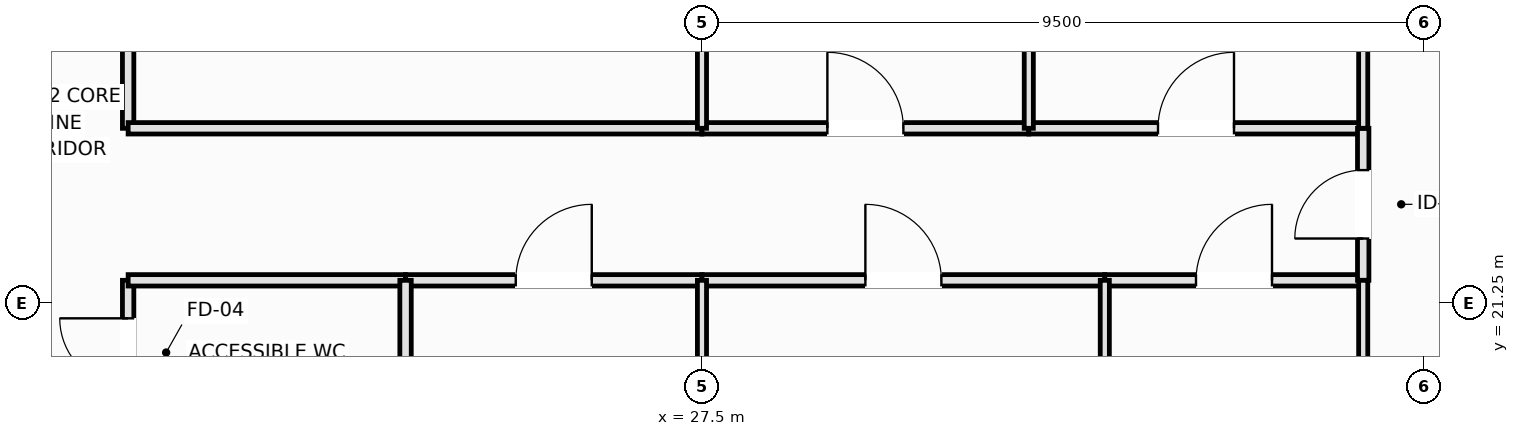
"""IFC4 building model, lengths in metres.
Left out: names, types, materials, properties, quantities, classifications, styles, units other than length and angle.
Written with IfcOpenShell. Run it as: python <this file> out.ifc"""

import sys

from ifc_helpers import new_model, si_unit, direction, frame, frame_2d, origin, place, context, subcontext, project, spatial, rectangle, extrude, element, fill, save


model = new_model("IFC4")
c1 = context("Model", 3, precision=1e-05, world=origin(), true_north=direction((0.0, 1.0)))
c2 = subcontext(c1, "Body", "Model", "MODEL_VIEW")
j1 = project(units=[si_unit("LENGTHUNIT", "METRE"), si_unit("PLANEANGLEUNIT", "RADIAN")], contexts=[c1])
p1 = place(None, origin())
s1 = spatial("IfcSite", under=j1, at=p1, CompositionType="ELEMENT")
p2 = place(p1, origin())
s2 = spatial("IfcBuilding", under=s1, at=p2, CompositionType="ELEMENT")
p3 = place(p2, frame((0.0, 0.0, 127.1)))
s3 = spatial("IfcBuildingStorey", under=s2, at=p3, CompositionType="ELEMENT", Elevation=127.1)
p4 = place(p3, frame((19.95, 19.65, 0.0), z_axis=(0.0, 0.0, 1.0), x_axis=(0.0, 1.0, 0.0)))
e1 = element("IfcWall", 1, at=p4, inside=s3, PredefinedType="PLUMBINGWALL", context=c2, shape_type="SweptSolid", body=[
    extrude(rectangle(XDim=1.9, YDim=0.15, at=frame_2d((0.95, 0.0))), origin(), (0.0, 0.0, 1.0), 3.37),
])
p5 = place(p4, frame((0.5, 0.0, 0.0)))
e2 = element("IfcOpeningElement", 2, at=p5, cuts=e1, PredefinedType="OPENING", context=c2, shape_type="SweptSolid", body=[
    extrude(rectangle(XDim=0.9, YDim=2.1, at=frame_2d((0.45, 1.05))), frame((0.0, 0.085, 0.0), z_axis=(0.0, -1.0, 0.0), x_axis=(1.0, 0.0, 0.0)), (0.0, 0.0, 1.0), 0.17),
])
p6 = place(p3, frame((19.95, 23.55, 0.0), z_axis=(0.0, 0.0, 1.0), x_axis=(0.0, 1.0, 0.0)))
e3 = element("IfcWall", 3, at=p6, inside=s3, PredefinedType="PARTITIONING", context=c2, shape_type="SweptSolid", body=[
    extrude(rectangle(XDim=6.25, YDim=0.15, at=frame_2d((3.125, 0.0))), origin(), (0.0, 0.0, 1.0), 3.37),
])
p7 = place(p6, frame((2.625, 0.0, 0.0)))
e4 = element("IfcOpeningElement", 4, at=p7, cuts=e3, PredefinedType="OPENING", context=c2, shape_type="SweptSolid", body=[
    extrude(rectangle(XDim=1.0, YDim=2.15, at=frame_2d((0.5, 1.075))), frame((0.0, 0.085, 0.0), z_axis=(0.0, -1.0, 0.0), x_axis=(1.0, 0.0, 0.0)), (0.0, 0.0, 1.0), 0.17),
])
p8 = place(p3, frame((19.95, 21.55, 0.0), z_axis=(0.0, 0.0, 1.0), x_axis=(1.0, 0.0, 0.0)))
e5 = element("IfcWall", 5, at=p8, inside=s3, PredefinedType="PLUMBINGWALL", context=c2, shape_type="SweptSolid", body=[
    extrude(rectangle(XDim=3.65, YDim=0.15, at=frame_2d((1.825, 0.0))), origin(), (0.0, 0.0, 1.0), 3.37),
])
p9 = place(p3, frame((23.6, 21.55, 0.0), z_axis=(0.0, 0.0, 1.0), x_axis=(1.0, 0.0, 0.0)))
e6 = element("IfcWall", 6, at=p9, inside=s3, PredefinedType="PARTITIONING", context=c2, shape_type="SweptSolid", body=[
    extrude(rectangle(XDim=3.9, YDim=0.15, at=frame_2d((1.95, 0.0))), origin(), (0.0, 0.0, 1.0), 3.37),
])
p10 = place(p9, frame((1.45, 0.0, 0.0)))
e7 = element("IfcOpeningElement", 7, at=p10, cuts=e6, PredefinedType="OPENING", context=c2, shape_type="SweptSolid", body=[
    extrude(rectangle(XDim=1.0, YDim=2.15, at=frame_2d((0.5, 1.075))), frame((0.0, 0.085, 0.0), z_axis=(0.0, -1.0, 0.0), x_axis=(1.0, 0.0, 0.0)), (0.0, 0.0, 1.0), 0.17),
])
p11 = place(p3, frame((19.95, 23.55, 0.0), z_axis=(0.0, 0.0, 1.0), x_axis=(1.0, 0.0, 0.0)))
e8 = element("IfcWall", 8, at=p11, inside=s3, PredefinedType="PARTITIONING", context=c2, shape_type="SweptSolid", body=[
    extrude(rectangle(XDim=7.55, YDim=0.15, at=frame_2d((3.775, 0.0))), origin(), (0.0, 0.0, 1.0), 3.37),
])
p12 = place(p3, frame((27.5, 21.55, 0.0), z_axis=(0.0, 0.0, 1.0), x_axis=(1.0, 0.0, 0.0)))
e9 = element("IfcWall", 9, at=p12, inside=s3, PredefinedType="PARTITIONING", context=c2, shape_type="SweptSolid", body=[
    extrude(rectangle(XDim=5.3, YDim=0.15, at=frame_2d((2.65, 0.0))), origin(), (0.0, 0.0, 1.0), 3.37),
])
p13 = place(p12, frame((2.15, 0.0, 0.0)))
e10 = element("IfcOpeningElement", 10, at=p13, cuts=e9, PredefinedType="OPENING", context=c2, shape_type="SweptSolid", body=[
    extrude(rectangle(XDim=1.0, YDim=2.15, at=frame_2d((0.5, 1.075))), frame((0.0, 0.085, 0.0), z_axis=(0.0, -1.0, 0.0), x_axis=(1.0, 0.0, 0.0)), (0.0, 0.0, 1.0), 0.17),
])
p14 = place(p3, frame((32.8, 21.55, 0.0), z_axis=(0.0, 0.0, 1.0), x_axis=(1.0, 0.0, 0.0)))
e11 = element("IfcWall", 11, at=p14, inside=s3, PredefinedType="PARTITIONING", context=c2, shape_type="SweptSolid", body=[
    extrude(rectangle(XDim=3.4, YDim=0.15, at=frame_2d((1.7, 0.0))), origin(), (0.0, 0.0, 1.0), 3.37),
])
p15 = place(p14, frame((1.2, 0.0, 0.0)))
e12 = element("IfcOpeningElement", 12, at=p15, cuts=e11, PredefinedType="OPENING", context=c2, shape_type="SweptSolid", body=[
    extrude(rectangle(XDim=1.0, YDim=2.15, at=frame_2d((0.5, 1.075))), frame((0.0, 0.085, 0.0), z_axis=(0.0, -1.0, 0.0), x_axis=(1.0, 0.0, 0.0)), (0.0, 0.0, 1.0), 0.17),
])
p16 = place(p3, frame((27.5, 23.55, 0.0), z_axis=(0.0, 0.0, 1.0), x_axis=(1.0, 0.0, 0.0)))
e13 = element("IfcWall", 13, at=p16, inside=s3, PredefinedType="PARTITIONING", context=c2, shape_type="SweptSolid", body=[
    extrude(rectangle(XDim=4.3, YDim=0.15, at=frame_2d((2.15, 0.0))), origin(), (0.0, 0.0, 1.0), 3.37),
])
p17 = place(p16, frame((1.65, 0.0, 0.0)))
e14 = element("IfcOpeningElement", 14, at=p17, cuts=e13, PredefinedType="OPENING", context=c2, shape_type="SweptSolid", body=[
    extrude(rectangle(XDim=1.0, YDim=2.15, at=frame_2d((0.5, 1.075))), frame((0.0, 0.085, 0.0), z_axis=(0.0, -1.0, 0.0), x_axis=(1.0, 0.0, 0.0)), (0.0, 0.0, 1.0), 0.17),
])
p18 = place(p3, frame((31.8, 23.55, 0.0), z_axis=(0.0, 0.0, 1.0), x_axis=(1.0, 0.0, 0.0)))
e15 = element("IfcWall", 15, at=p18, inside=s3, PredefinedType="PARTITIONING", context=c2, shape_type="SweptSolid", body=[
    extrude(rectangle(XDim=4.4, YDim=0.15, at=frame_2d((2.2, 0.0))), origin(), (0.0, 0.0, 1.0), 3.37),
])
p19 = place(p18, frame((1.7, 0.0, 0.0)))
e16 = element("IfcOpeningElement", 16, at=p19, cuts=e15, PredefinedType="OPENING", context=c2, shape_type="SweptSolid", body=[
    extrude(rectangle(XDim=1.0, YDim=2.15, at=frame_2d((0.5, 1.075))), frame((0.0, 0.085, 0.0), z_axis=(0.0, -1.0, 0.0), x_axis=(1.0, 0.0, 0.0)), (0.0, 0.0, 1.0), 0.17),
])
p20 = place(p3, frame((36.2, 21.55, 0.0), z_axis=(0.0, 0.0, 1.0), x_axis=(0.0, 1.0, 0.0)))
e17 = element("IfcWall", 17, at=p20, inside=s3, PredefinedType="PARTITIONING", context=c2, shape_type="SweptSolid", body=[
    extrude(rectangle(XDim=2.0, YDim=0.15, at=frame_2d((1.0, 0.0))), origin(), (0.0, 0.0, 1.0), 3.37),
])
p21 = place(p20, frame((0.55, 0.0, 0.0)))
e18 = element("IfcOpeningElement", 18, at=p21, cuts=e17, PredefinedType="OPENING", context=c2, shape_type="SweptSolid", body=[
    extrude(rectangle(XDim=0.9, YDim=2.1, at=frame_2d((0.45, 1.05))), frame((0.0, 0.085, 0.0), z_axis=(0.0, -1.0, 0.0), x_axis=(1.0, 0.0, 0.0)), (0.0, 0.0, 1.0), 0.17),
])
p22 = place(p3, frame((23.6, 19.65, 0.0), z_axis=(0.0, 0.0, 1.0), x_axis=(0.0, 1.0, 0.0)))
e19 = element("IfcWall", 19, at=p22, inside=s3, PredefinedType="PLUMBINGWALL", context=c2, shape_type="SweptSolid", body=[
    extrude(rectangle(XDim=1.9, YDim=0.15, at=frame_2d((0.95, 0.0))), origin(), (0.0, 0.0, 1.0), 3.37),
])
p23 = place(p3, frame((27.5, 18.7, 0.0), z_axis=(0.0, 0.0, 1.0), x_axis=(0.0, 1.0, 0.0)))
e20 = element("IfcWall", 20, at=p23, inside=s3, PredefinedType="PARTITIONING", context=c2, shape_type="SweptSolid", body=[
    extrude(rectangle(XDim=2.85, YDim=0.12, at=frame_2d((1.425, 0.0))), origin(), (0.0, 0.0, 1.0), 3.37),
])
p24 = place(p3, frame((27.5, 23.55, 0.0), z_axis=(0.0, 0.0, 1.0), x_axis=(0.0, 1.0, 0.0)))
e21 = element("IfcWall", 21, at=p24, inside=s3, PredefinedType="PARTITIONING", context=c2, shape_type="SweptSolid", body=[
    extrude(rectangle(XDim=6.25, YDim=0.12, at=frame_2d((3.125, 0.0))), origin(), (0.0, 0.0, 1.0), 3.37),
])
for number, where, z_axis, x_axis in (
    (22, (32.8, 3.51, 0.0), (0.0, 0.0, 1.0), (0.0, 1.0, 0.0)),
    (23, (36.2, 3.51, 0.0), (0.0, 0.0, 1.0), (0.0, 1.0, 0.0)),
):
    element("IfcWall", number, at=place(p3, frame(where, z_axis=z_axis, x_axis=x_axis)), inside=s3, PredefinedType="PARTITIONING", context=c2, shape_type="SweptSolid", body=[
        extrude(rectangle(XDim=18.04, YDim=0.12, at=frame_2d((9.02, 0.0))), origin(), (0.0, 0.0, 1.0), 3.37),
    ])
for number, where, z_axis, x_axis in (
    (24, (31.8, 23.55, 0.0), (0.0, 0.0, 1.0), (0.0, 1.0, 0.0)),
    (25, (36.2, 23.55, 0.0), (0.0, 0.0, 1.0), (0.0, 1.0, 0.0)),
):
    element("IfcWall", number, at=place(p3, frame(where, z_axis=z_axis, x_axis=x_axis)), inside=s3, PredefinedType="PARTITIONING", context=c2, shape_type="SweptSolid", body=[
        extrude(rectangle(XDim=22.94, YDim=0.12, at=frame_2d((11.47, 0.0))), origin(), (0.0, 0.0, 1.0), 3.37),
    ])
p25 = place(p5, origin())
e26 = element("IfcDoor", 26, at=p25, inside=s3, OperationType="SINGLE_SWING_RIGHT", PredefinedType="DOOR", context=c2, shape_type="SweptSolid", body=[
    extrude(rectangle(XDim=0.9, YDim=2.1, at=frame_2d((0.45, 1.05))), frame((0.0, 0.025, 0.0), z_axis=(0.0, -1.0, 0.0), x_axis=(1.0, 0.0, 0.0)), (0.0, 0.0, 1.0), 0.05),
])
fill(e2, e26)
p26 = place(p10, origin())
e27 = element("IfcDoor", 27, at=p26, inside=s3, OperationType="SINGLE_SWING_RIGHT", PredefinedType="DOOR", context=c2, shape_type="SweptSolid", body=[
    extrude(rectangle(XDim=1.0, YDim=2.15, at=frame_2d((0.5, 1.075))), frame((0.0, 0.025, 0.0), z_axis=(0.0, -1.0, 0.0), x_axis=(1.0, 0.0, 0.0)), (0.0, 0.0, 1.0), 0.05),
])
fill(e7, e27)
p27 = place(p13, origin())
e28 = element("IfcDoor", 28, at=p27, inside=s3, OperationType="SINGLE_SWING_LEFT", PredefinedType="DOOR", context=c2, shape_type="SweptSolid", body=[
    extrude(rectangle(XDim=1.0, YDim=2.15, at=frame_2d((0.5, 1.075))), frame((0.0, 0.025, 0.0), z_axis=(0.0, -1.0, 0.0), x_axis=(1.0, 0.0, 0.0)), (0.0, 0.0, 1.0), 0.05),
])
fill(e10, e28)
p28 = place(p15, origin())
e29 = element("IfcDoor", 29, at=p28, inside=s3, OperationType="SINGLE_SWING_RIGHT", PredefinedType="DOOR", context=c2, shape_type="SweptSolid", body=[
    extrude(rectangle(XDim=1.0, YDim=2.15, at=frame_2d((0.5, 1.075))), frame((0.0, 0.025, 0.0), z_axis=(0.0, -1.0, 0.0), x_axis=(1.0, 0.0, 0.0)), (0.0, 0.0, 1.0), 0.05),
])
fill(e12, e29)
p29 = place(p17, origin())
e30 = element("IfcDoor", 30, at=p29, inside=s3, OperationType="SINGLE_SWING_LEFT", PredefinedType="DOOR", context=c2, shape_type="SweptSolid", body=[
    extrude(rectangle(XDim=1.0, YDim=2.15, at=frame_2d((0.5, 1.075))), frame((0.0, 0.025, 0.0), z_axis=(0.0, -1.0, 0.0), x_axis=(1.0, 0.0, 0.0)), (0.0, 0.0, 1.0), 0.05),
])
fill(e14, e30)
p30 = place(p19, origin())
e31 = element("IfcDoor", 31, at=p30, inside=s3, OperationType="SINGLE_SWING_RIGHT", PredefinedType="DOOR", context=c2, shape_type="SweptSolid", body=[
    extrude(rectangle(XDim=1.0, YDim=2.15, at=frame_2d((0.5, 1.075))), frame((0.0, 0.025, 0.0), z_axis=(0.0, -1.0, 0.0), x_axis=(1.0, 0.0, 0.0)), (0.0, 0.0, 1.0), 0.05),
])
fill(e16, e31)
p31 = place(p21, origin())
e32 = element("IfcDoor", 32, at=p31, inside=s3, OperationType="SINGLE_SWING_LEFT", PredefinedType="DOOR", context=c2, shape_type="SweptSolid", body=[
    extrude(rectangle(XDim=0.9, YDim=2.1, at=frame_2d((0.45, 1.05))), frame((0.0, 0.025, 0.0), z_axis=(0.0, -1.0, 0.0), x_axis=(1.0, 0.0, 0.0)), (0.0, 0.0, 1.0), 0.05),
])
fill(e18, e32)
save(model, sys.argv[1])
